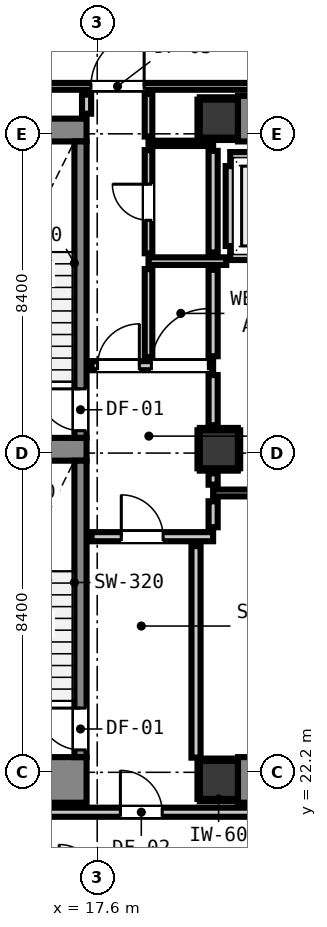
"""IFC4 building model, lengths in metres.
Left out: names, types, materials, properties, quantities, classifications, styles, units other than length and angle.
Written with IfcOpenShell. Run it as: python <this file> out.ifc"""

import sys

from ifc_helpers import new_model, si_unit, direction, frame, frame_2d, origin, origin_2d, place, context, subcontext, project, spatial, rectangle, extrude, element, fill, save


model = new_model("IFC4")
c1 = context("Model", 3, precision=1e-05, world=origin(), true_north=direction((0.0, 1.0)))
c2 = subcontext(c1, "Body", "Model", "MODEL_VIEW")
j1 = project(units=[si_unit("LENGTHUNIT", "METRE"), si_unit("PLANEANGLEUNIT", "RADIAN")], contexts=[c1])
p1 = place(None, origin())
s1 = spatial("IfcSite", under=j1, at=p1, CompositionType="ELEMENT")
p2 = place(p1, origin())
s2 = spatial("IfcBuilding", under=s1, at=p2, CompositionType="ELEMENT")
p3 = place(p2, frame((0.0, 0.0, 5.2)))
s3 = spatial("IfcBuildingStorey", under=s2, at=p3, CompositionType="ELEMENT", Elevation=5.2)
for number, where, z_axis, x_axis in (
    (1, (20.8, 22.0, 0.0), (0.0, 0.0, 1.0), (1.0, 0.0, 0.0)),
    (2, (20.8, 39.4, 0.0), (0.0, 0.0, 1.0), (1.0, 0.0, 0.0)),
):
    element("IfcColumn", number, at=place(p3, frame(where, z_axis=z_axis, x_axis=x_axis)), inside=s3, PredefinedType="COLUMN", context=c2, shape_type="SweptSolid", body=[
        extrude(rectangle(XDim=1.0, YDim=1.0, at=origin_2d()), origin(), (0.0, 0.0, 1.0), 4.2),
    ])
p4 = place(p3, frame((13.24, 22.0, 0.0), z_axis=(0.0, 0.0, 1.0), x_axis=(1.0, 0.0, 0.0)))
e3 = element("IfcWall", 3, at=p4, inside=s3, PredefinedType="SHEAR", context=c2, shape_type="SweptSolid", body=[
    extrude(rectangle(XDim=4.08, YDim=1.2, at=frame_2d((2.04, 0.0))), origin(), (0.0, 0.0, 1.0), 4.2),
])
p5 = place(p3, frame((13.24, 39.1, 0.0), z_axis=(0.0, 0.0, 1.0), x_axis=(1.0, 0.0, 0.0)))
e4 = element("IfcWall", 4, at=p5, inside=s3, PredefinedType="SHEAR", context=c2, shape_type="SweptSolid", body=[
    extrude(rectangle(XDim=4.08, YDim=0.6, at=frame_2d((2.04, 0.0))), origin(), (0.0, 0.0, 1.0), 4.2),
])
p6 = place(p3, frame((13.905, 30.7, 0.0), z_axis=(0.0, 0.0, 1.0), x_axis=(1.0, 0.0, 0.0)))
e5 = element("IfcWall", 5, at=p6, inside=s3, PredefinedType="SHEAR", context=c2, shape_type="SweptSolid", body=[
    extrude(rectangle(XDim=3.415, YDim=0.6, at=frame_2d((1.708, 0.0))), origin(), (0.0, 0.0, 1.0), 4.2),
])
for number, where, z_axis, x_axis in (
    (6, (21.305, 22.0, 0.0), (0.0, 0.0, 1.0), (1.0, 0.0, 0.0)),
    (7, (21.305, 39.4, 0.0), (0.0, 0.0, 1.0), (1.0, 0.0, 0.0)),
):
    element("IfcWall", number, at=place(p3, frame(where, z_axis=z_axis, x_axis=x_axis)), inside=s3, PredefinedType="SHEAR", context=c2, shape_type="SweptSolid", body=[
        extrude(rectangle(XDim=7.39, YDim=1.2, at=frame_2d((3.695, 0.0))), origin(), (0.0, 0.0, 1.0), 4.2),
    ])
p7 = place(p3, frame((17.16, 31.0, 0.0), z_axis=(0.0, 0.0, 1.0), x_axis=(0.0, 1.0, 0.0)))
e8 = element("IfcWall", 8, at=p7, inside=s3, PredefinedType="SHEAR", context=c2, shape_type="SweptSolid", body=[
    extrude(rectangle(XDim=7.8, YDim=0.32, at=frame_2d((3.9, 0.0))), origin(), (0.0, 0.0, 1.0), 4.2),
])
p8 = place(p7, frame((0.19, 0.0, 0.0)))
e9 = element("IfcOpeningElement", 9, at=p8, cuts=e8, PredefinedType="OPENING", context=c2, shape_type="SweptSolid", body=[
    extrude(rectangle(XDim=1.1, YDim=2.15, at=frame_2d((0.55, 1.075))), frame((0.0, 0.17, 0.0), z_axis=(0.0, -1.0, 0.0), x_axis=(1.0, 0.0, 0.0)), (0.0, 0.0, 1.0), 0.34),
])
p9 = place(p3, frame((17.16, 22.6, 0.0), z_axis=(0.0, 0.0, 1.0), x_axis=(0.0, 1.0, 0.0)))
e10 = element("IfcWall", 10, at=p9, inside=s3, PredefinedType="SHEAR", context=c2, shape_type="SweptSolid", body=[
    extrude(rectangle(XDim=7.8, YDim=0.32, at=frame_2d((3.9, 0.0))), origin(), (0.0, 0.0, 1.0), 4.2),
])
p10 = place(p9, frame((0.19, 0.0, 0.0)))
e11 = element("IfcOpeningElement", 11, at=p10, cuts=e10, PredefinedType="OPENING", context=c2, shape_type="SweptSolid", body=[
    extrude(rectangle(XDim=1.1, YDim=2.15, at=frame_2d((0.55, 1.075))), frame((0.0, 0.17, 0.0), z_axis=(0.0, -1.0, 0.0), x_axis=(1.0, 0.0, 0.0)), (0.0, 0.0, 1.0), 0.34),
])
p11 = place(p3, frame((20.8, 30.7, 0.0), z_axis=(0.0, 0.0, 1.0), x_axis=(1.0, 0.0, 0.0)))
e12 = element("IfcColumn", 12, at=p11, inside=s3, PredefinedType="COLUMN", context=c2, shape_type="SweptSolid", body=[
    extrude(rectangle(XDim=1.0, YDim=1.0, at=origin_2d()), origin(), (0.0, 0.0, 1.0), 4.2),
])
for number, where, z_axis, x_axis in (
    (13, (21.1, 35.8, 0.0), (0.0, 0.0, 1.0), (1.0, 0.0, 0.0)),
    (14, (21.1, 38.4, 0.0), (0.0, 0.0, 1.0), (1.0, 0.0, 0.0)),
):
    element("IfcWall", number, at=place(p3, frame(where, z_axis=z_axis, x_axis=x_axis)), inside=s3, PredefinedType="PARTITIONING", context=c2, shape_type="SweptSolid", body=[
        extrude(rectangle(XDim=2.2, YDim=0.24, at=frame_2d((1.1, 0.0))), origin(), (0.0, 0.0, 1.0), 3.92),
    ])
p12 = place(p3, frame((21.1, 36.048, 0.0), z_axis=(0.0, 0.0, 1.0), x_axis=(0.0, 1.0, 0.0)))
e15 = element("IfcWall", 15, at=p12, inside=s3, PredefinedType="PARTITIONING", context=c2, shape_type="SweptSolid", body=[
    extrude(rectangle(XDim=2.104, YDim=0.24, at=frame_2d((1.052, 0.0))), origin(), (0.0, 0.0, 1.0), 2.955),
])
p13 = place(p3, frame((10.5, 21.15, 0.0), z_axis=(0.0, 0.0, 1.0), x_axis=(1.0, 0.0, 0.0)))
e16 = element("IfcWall", 16, at=p13, inside=s3, PredefinedType="PARTITIONING", context=c2, shape_type="SweptSolid", body=[
    extrude(rectangle(XDim=28.7, YDim=0.24, at=frame_2d((14.35, 0.0))), origin(), (0.0, 0.0, 1.0), 3.92),
])
p14 = place(p13, frame((7.71, 0.0, 0.0)))
e17 = element("IfcOpeningElement", 17, at=p14, cuts=e16, PredefinedType="OPENING", context=c2, shape_type="SweptSolid", body=[
    extrude(rectangle(XDim=1.1, YDim=2.15, at=frame_2d((0.55, 1.075))), frame((0.0, 0.13, 0.0), z_axis=(0.0, -1.0, 0.0), x_axis=(1.0, 0.0, 0.0)), (0.0, 0.0, 1.0), 0.26),
])
p15 = place(p13, frame((0.324, 0.0, 0.0)))
e18 = element("IfcOpeningElement", 18, at=p15, cuts=e16, PredefinedType="OPENING", context=c2, shape_type="SweptSolid", body=[
    extrude(rectangle(XDim=1.4, YDim=2.15, at=frame_2d((0.7, 1.075))), frame((0.0, 0.13, 0.0), z_axis=(0.0, -1.0, 0.0), x_axis=(1.0, 0.0, 0.0)), (0.0, 0.0, 1.0), 0.26),
])
p16 = place(p13, frame((27.026, 0.0, 0.0)))
e19 = element("IfcOpeningElement", 19, at=p16, cuts=e16, PredefinedType="OPENING", context=c2, shape_type="SweptSolid", body=[
    extrude(rectangle(XDim=1.4, YDim=2.15, at=frame_2d((0.7, 1.075))), frame((0.0, 0.13, 0.0), z_axis=(0.0, -1.0, 0.0), x_axis=(1.0, 0.0, 0.0)), (0.0, 0.0, 1.0), 0.26),
])
p17 = place(p3, frame((17.45, 28.4, 0.0), z_axis=(0.0, 0.0, 1.0), x_axis=(1.0, 0.0, 0.0)))
e20 = element("IfcWall", 20, at=p17, inside=s3, PredefinedType="PARTITIONING", context=c2, shape_type="SweptSolid", body=[
    extrude(rectangle(XDim=3.2, YDim=0.24, at=frame_2d((1.6, 0.0))), origin(), (0.0, 0.0, 1.0), 3.92),
])
p18 = place(p17, frame((0.784, 0.0, 0.0)))
e21 = element("IfcOpeningElement", 21, at=p18, cuts=e20, PredefinedType="OPENING", context=c2, shape_type="SweptSolid", body=[
    extrude(rectangle(XDim=1.1, YDim=2.15, at=frame_2d((0.55, 1.075))), frame((0.0, 0.13, 0.0), z_axis=(0.0, -1.0, 0.0), x_axis=(1.0, 0.0, 0.0)), (0.0, 0.0, 1.0), 0.26),
])
p19 = place(p3, frame((17.45, 32.9, 0.0), z_axis=(0.0, 0.0, 1.0), x_axis=(1.0, 0.0, 0.0)))
e22 = element("IfcWall", 22, at=p19, inside=s3, PredefinedType="PARTITIONING", context=c2, shape_type="SweptSolid", body=[
    extrude(rectangle(XDim=3.2, YDim=0.24, at=frame_2d((1.6, 0.0))), origin(), (0.0, 0.0, 1.0), 3.92),
])
p20 = place(p19, frame((0.159, 0.0, 0.0)))
e23 = element("IfcOpeningElement", 23, at=p20, cuts=e22, PredefinedType="OPENING", context=c2, shape_type="SweptSolid", body=[
    extrude(rectangle(XDim=1.1, YDim=2.15, at=frame_2d((0.55, 1.075))), frame((0.0, 0.13, 0.0), z_axis=(0.0, -1.0, 0.0), x_axis=(1.0, 0.0, 0.0)), (0.0, 0.0, 1.0), 0.26),
])
p21 = place(p19, frame((1.576, 0.0, 0.0)))
e24 = element("IfcOpeningElement", 24, at=p21, cuts=e22, PredefinedType="OPENING", context=c2, shape_type="SweptSolid", body=[
    extrude(rectangle(XDim=1.5, YDim=2.15, at=frame_2d((0.75, 1.075))), frame((0.0, 0.13, 0.0), z_axis=(0.0, -1.0, 0.0), x_axis=(1.0, 0.0, 0.0)), (0.0, 0.0, 1.0), 0.26),
])
p22 = place(p3, frame((18.95, 35.65, 0.0), z_axis=(0.0, 0.0, 1.0), x_axis=(1.0, 0.0, 0.0)))
e25 = element("IfcWall", 25, at=p22, inside=s3, PredefinedType="PARTITIONING", context=c2, shape_type="SweptSolid", body=[
    extrude(rectangle(XDim=2.046, YDim=0.2, at=frame_2d((1.023, 0.0))), origin(), (0.0, 0.0, 1.0), 3.92),
])
p23 = place(p3, frame((20.65, 29.55, 0.0), z_axis=(0.0, 0.0, 1.0), x_axis=(1.0, 0.0, 0.0)))
e26 = element("IfcWall", 26, at=p23, inside=s3, PredefinedType="PARTITIONING", context=c2, shape_type="SweptSolid", body=[
    extrude(rectangle(XDim=9.325, YDim=0.18, at=frame_2d((4.663, 0.0))), origin(), (0.0, 0.0, 1.0), 3.92),
])
p24 = place(p3, frame((10.5, 40.25, 0.0), z_axis=(0.0, 0.0, 1.0), x_axis=(1.0, 0.0, 0.0)))
e27 = element("IfcWall", 27, at=p24, inside=s3, PredefinedType="PARTITIONING", context=c2, shape_type="SweptSolid", body=[
    extrude(rectangle(XDim=37.148, YDim=0.18, at=frame_2d((18.574, 0.0))), origin(), (0.0, 0.0, 1.0), 3.92),
])
p25 = place(p24, frame((6.935, 0.0, 0.0)))
e28 = element("IfcOpeningElement", 28, at=p25, cuts=e27, PredefinedType="OPENING", context=c2, shape_type="SweptSolid", body=[
    extrude(rectangle(XDim=1.4, YDim=2.15, at=frame_2d((0.7, 1.075))), frame((0.0, 0.1, 0.0), z_axis=(0.0, -1.0, 0.0), x_axis=(1.0, 0.0, 0.0)), (0.0, 0.0, 1.0), 0.2),
])
p26 = place(p24, frame((0.324, 0.0, 0.0)))
e29 = element("IfcOpeningElement", 29, at=p26, cuts=e27, PredefinedType="OPENING", context=c2, shape_type="SweptSolid", body=[
    extrude(rectangle(XDim=1.4, YDim=2.15, at=frame_2d((0.7, 1.075))), frame((0.0, 0.1, 0.0), z_axis=(0.0, -1.0, 0.0), x_axis=(1.0, 0.0, 0.0)), (0.0, 0.0, 1.0), 0.2),
])
p27 = place(p24, frame((27.05, 0.0, 0.0)))
e30 = element("IfcOpeningElement", 30, at=p27, cuts=e27, PredefinedType="OPENING", context=c2, shape_type="SweptSolid", body=[
    extrude(rectangle(XDim=1.4, YDim=2.15, at=frame_2d((0.7, 1.075))), frame((0.0, 0.1, 0.0), z_axis=(0.0, -1.0, 0.0), x_axis=(1.0, 0.0, 0.0)), (0.0, 0.0, 1.0), 0.2),
])
p28 = place(p3, frame((18.95, 38.75, 0.0), z_axis=(0.0, 0.0, 1.0), x_axis=(1.0, 0.0, 0.0)))
e31 = element("IfcWall", 31, at=p28, inside=s3, PredefinedType="PARTITIONING", context=c2, shape_type="SweptSolid", body=[
    extrude(rectangle(XDim=1.7, YDim=0.14, at=frame_2d((0.85, 0.0))), origin(), (0.0, 0.0, 1.0), 3.92),
])
p29 = place(p3, frame((17.32, 39.53, 0.0), z_axis=(0.0, 0.0, 1.0), x_axis=(0.0, 1.0, 0.0)))
e32 = element("IfcWall", 32, at=p29, inside=s3, PredefinedType="PARTITIONING", context=c2, shape_type="SweptSolid", body=[
    extrude(rectangle(XDim=0.502, YDim=0.24, at=frame_2d((0.251, 0.0))), origin(), (0.0, 0.0, 1.0), 3.92),
])
p30 = place(p3, frame((20.2, 22.586, 0.0), z_axis=(0.0, 0.0, 1.0), x_axis=(0.0, 1.0, 0.0)))
e33 = element("IfcWall", 33, at=p30, inside=s3, PredefinedType="PARTITIONING", context=c2, shape_type="SweptSolid", body=[
    extrude(rectangle(XDim=5.566, YDim=0.24, at=frame_2d((2.783, 0.0))), origin(), (0.0, 0.0, 1.0), 3.92),
])
p31 = place(p3, frame((20.65, 28.648, 0.0), z_axis=(0.0, 0.0, 1.0), x_axis=(0.0, 1.0, 0.0)))
e34 = element("IfcWall", 34, at=p31, inside=s3, PredefinedType="PARTITIONING", context=c2, shape_type="SweptSolid", body=[
    extrude(rectangle(XDim=0.684, YDim=0.24, at=frame_2d((0.342, 0.0))), origin(), (0.0, 0.0, 1.0), 2.955),
])
p32 = place(p3, frame((20.65, 29.768, 0.0), z_axis=(0.0, 0.0, 1.0), x_axis=(0.0, 1.0, 0.0)))
e35 = element("IfcWall", 35, at=p32, inside=s3, PredefinedType="PARTITIONING", context=c2, shape_type="SweptSolid", body=[
    extrude(rectangle(XDim=0.3, YDim=0.24, at=frame_2d((0.15, 0.0))), origin(), (0.0, 0.0, 1.0), 2.955),
])
p33 = place(p3, frame((20.65, 31.332, 0.0), z_axis=(0.0, 0.0, 1.0), x_axis=(0.0, 1.0, 0.0)))
e36 = element("IfcWall", 36, at=p33, inside=s3, PredefinedType="PARTITIONING", context=c2, shape_type="SweptSolid", body=[
    extrude(rectangle(XDim=1.32, YDim=0.24, at=frame_2d((0.66, 0.0))), origin(), (0.0, 0.0, 1.0), 2.955),
])
p34 = place(p3, frame((20.65, 33.148, 0.0), z_axis=(0.0, 0.0, 1.0), x_axis=(0.0, 1.0, 0.0)))
e37 = element("IfcWall", 37, at=p34, inside=s3, PredefinedType="PARTITIONING", context=c2, shape_type="SweptSolid", body=[
    extrude(rectangle(XDim=2.274, YDim=0.24, at=frame_2d((1.137, 0.0))), origin(), (0.0, 0.0, 1.0), 2.955),
])
p35 = place(p3, frame((20.65, 35.878, 0.0), z_axis=(0.0, 0.0, 1.0), x_axis=(0.0, 1.0, 0.0)))
e38 = element("IfcWall", 38, at=p35, inside=s3, PredefinedType="PARTITIONING", context=c2, shape_type="SweptSolid", body=[
    extrude(rectangle(XDim=2.674, YDim=0.24, at=frame_2d((1.337, 0.0))), origin(), (0.0, 0.0, 1.0), 2.955),
])
p36 = place(p3, frame((18.95, 33.128, 0.0), z_axis=(0.0, 0.0, 1.0), x_axis=(0.0, 1.0, 0.0)))
e39 = element("IfcWall", 39, at=p36, inside=s3, PredefinedType="PARTITIONING", context=c2, shape_type="SweptSolid", body=[
    extrude(rectangle(XDim=2.314, YDim=0.2, at=frame_2d((1.157, 0.0))), origin(), (0.0, 0.0, 1.0), 3.92),
])
p37 = place(p3, frame((18.95, 35.858, 0.0), z_axis=(0.0, 0.0, 1.0), x_axis=(0.0, 1.0, 0.0)))
e40 = element("IfcWall", 40, at=p37, inside=s3, PredefinedType="PARTITIONING", context=c2, shape_type="SweptSolid", body=[
    extrude(rectangle(XDim=2.714, YDim=0.2, at=frame_2d((1.357, 0.0))), origin(), (0.0, 0.0, 1.0), 3.92),
])
p38 = place(p37, frame((0.867, 0.0, 0.0)))
e41 = element("IfcOpeningElement", 41, at=p38, cuts=e40, PredefinedType="OPENING", context=c2, shape_type="SweptSolid", body=[
    extrude(rectangle(XDim=0.95, YDim=2.1, at=frame_2d((0.475, 1.05))), frame((0.0, 0.11, 0.0), z_axis=(0.0, -1.0, 0.0), x_axis=(1.0, 0.0, 0.0)), (0.0, 0.0, 1.0), 0.22),
])
p39 = place(p3, frame((18.95, 38.928, 0.0), z_axis=(0.0, 0.0, 1.0), x_axis=(0.0, 1.0, 0.0)))
e42 = element("IfcWall", 42, at=p39, inside=s3, PredefinedType="PARTITIONING", context=c2, shape_type="SweptSolid", body=[
    extrude(rectangle(XDim=1.124, YDim=0.2, at=frame_2d((0.562, 0.0))), origin(), (0.0, 0.0, 1.0), 3.92),
])
for number, where, z_axis, x_axis in (
    (43, (20.3, 21.468, 0.0), (0.0, 0.0, 1.0), (1.0, 0.0, 0.0)),
    (44, (20.3, 22.532, 0.0), (0.0, 0.0, 1.0), (1.0, 0.0, 0.0)),
):
    element("IfcWall", number, at=place(p3, frame(where, z_axis=z_axis, x_axis=x_axis)), inside=s3, PredefinedType="PARTITIONING", context=c2, shape_type="SweptSolid", body=[
        extrude(rectangle(XDim=0.99, YDim=0.06, at=frame_2d((0.495, 0.0))), origin(), (0.0, 0.0, 1.0), 1.45),
    ])
p40 = place(p3, frame((20.268, 21.5, 0.0), z_axis=(0.0, 0.0, 1.0), x_axis=(0.0, 1.0, 0.0)))
e45 = element("IfcWall", 45, at=p40, inside=s3, PredefinedType="PARTITIONING", context=c2, shape_type="SweptSolid", body=[
    extrude(rectangle(XDim=1.0, YDim=0.06, at=frame_2d((0.5, 0.0))), origin(), (0.0, 0.0, 1.0), 1.45),
])
for number, where, z_axis, x_axis in (
    (46, (20.3, 38.868, 0.0), (0.0, 0.0, 1.0), (1.0, 0.0, 0.0)),
    (47, (20.3, 39.932, 0.0), (0.0, 0.0, 1.0), (1.0, 0.0, 0.0)),
):
    element("IfcWall", number, at=place(p3, frame(where, z_axis=z_axis, x_axis=x_axis)), inside=s3, PredefinedType="PARTITIONING", context=c2, shape_type="SweptSolid", body=[
        extrude(rectangle(XDim=0.99, YDim=0.06, at=frame_2d((0.495, 0.0))), origin(), (0.0, 0.0, 1.0), 1.45),
    ])
for number, where, z_axis, x_axis in (
    (48, (20.268, 38.9, 0.0), (0.0, 0.0, 1.0), (0.0, 1.0, 0.0)),
    (49, (20.3, 30.168, 0.0), (0.0, 0.0, 1.0), (1.0, 0.0, 0.0)),
    (50, (20.3, 31.232, 0.0), (0.0, 0.0, 1.0), (1.0, 0.0, 0.0)),
    (51, (20.268, 30.2, 0.0), (0.0, 0.0, 1.0), (0.0, 1.0, 0.0)),
    (52, (21.332, 30.2, 0.0), (0.0, 0.0, 1.0), (0.0, 1.0, 0.0)),
):
    element("IfcWall", number, at=place(p3, frame(where, z_axis=z_axis, x_axis=x_axis)), inside=s3, PredefinedType="PARTITIONING", context=c2, shape_type="SweptSolid", body=[
        extrude(rectangle(XDim=1.0, YDim=0.06, at=frame_2d((0.5, 0.0))), origin(), (0.0, 0.0, 1.0), 1.45),
    ])
p41 = place(p8, origin())
e53 = element("IfcDoor", 53, at=p41, inside=s3, OperationType="SINGLE_SWING_RIGHT", PredefinedType="DOOR", context=c2, shape_type="SweptSolid", body=[
    extrude(rectangle(XDim=1.1, YDim=2.15, at=frame_2d((0.55, 1.075))), frame((0.0, 0.025, 0.0), z_axis=(0.0, -1.0, 0.0), x_axis=(1.0, 0.0, 0.0)), (0.0, 0.0, 1.0), 0.05),
])
fill(e9, e53)
p42 = place(p10, origin())
e54 = element("IfcDoor", 54, at=p42, inside=s3, OperationType="SINGLE_SWING_RIGHT", PredefinedType="DOOR", context=c2, shape_type="SweptSolid", body=[
    extrude(rectangle(XDim=1.1, YDim=2.15, at=frame_2d((0.55, 1.075))), frame((0.0, 0.025, 0.0), z_axis=(0.0, -1.0, 0.0), x_axis=(1.0, 0.0, 0.0)), (0.0, 0.0, 1.0), 0.05),
])
fill(e11, e54)
p43 = place(p18, origin())
e55 = element("IfcDoor", 55, at=p43, inside=s3, OperationType="SINGLE_SWING_LEFT", PredefinedType="DOOR", context=c2, shape_type="SweptSolid", body=[
    extrude(rectangle(XDim=1.1, YDim=2.15, at=frame_2d((0.55, 1.075))), frame((0.0, 0.025, 0.0), z_axis=(0.0, -1.0, 0.0), x_axis=(1.0, 0.0, 0.0)), (0.0, 0.0, 1.0), 0.05),
])
fill(e21, e55)
p44 = place(p20, origin())
e56 = element("IfcDoor", 56, at=p44, inside=s3, OperationType="SINGLE_SWING_RIGHT", PredefinedType="DOOR", context=c2, shape_type="SweptSolid", body=[
    extrude(rectangle(XDim=1.1, YDim=2.15, at=frame_2d((0.55, 1.075))), frame((0.0, 0.025, 0.0), z_axis=(0.0, -1.0, 0.0), x_axis=(1.0, 0.0, 0.0)), (0.0, 0.0, 1.0), 0.05),
])
fill(e23, e56)
p45 = place(p14, origin())
e57 = element("IfcDoor", 57, at=p45, inside=s3, OperationType="SINGLE_SWING_LEFT", PredefinedType="DOOR", context=c2, shape_type="SweptSolid", body=[
    extrude(rectangle(XDim=1.1, YDim=2.15, at=frame_2d((0.55, 1.075))), frame((0.0, 0.025, 0.0), z_axis=(0.0, -1.0, 0.0), x_axis=(1.0, 0.0, 0.0)), (0.0, 0.0, 1.0), 0.05),
])
fill(e17, e57)
p46 = place(p25, origin())
e58 = element("IfcDoor", 58, at=p46, inside=s3, OperationType="SINGLE_SWING_RIGHT", PredefinedType="DOOR", context=c2, shape_type="SweptSolid", body=[
    extrude(rectangle(XDim=1.4, YDim=2.15, at=frame_2d((0.7, 1.075))), frame((0.0, 0.025, 0.0), z_axis=(0.0, -1.0, 0.0), x_axis=(1.0, 0.0, 0.0)), (0.0, 0.0, 1.0), 0.05),
])
fill(e28, e58)
p47 = place(p21, origin())
e59 = element("IfcDoor", 59, at=p47, inside=s3, OperationType="SINGLE_SWING_RIGHT", PredefinedType="DOOR", context=c2, shape_type="SweptSolid", body=[
    extrude(rectangle(XDim=1.5, YDim=2.15, at=frame_2d((0.75, 1.075))), frame((0.0, 0.025, 0.0), z_axis=(0.0, -1.0, 0.0), x_axis=(1.0, 0.0, 0.0)), (0.0, 0.0, 1.0), 0.05),
])
fill(e24, e59)
p48 = place(p38, origin())
e60 = element("IfcDoor", 60, at=p48, inside=s3, OperationType="SINGLE_SWING_RIGHT", PredefinedType="DOOR", context=c2, shape_type="SweptSolid", body=[
    extrude(rectangle(XDim=0.95, YDim=2.1, at=frame_2d((0.475, 1.05))), frame((0.0, 0.025, 0.0), z_axis=(0.0, -1.0, 0.0), x_axis=(1.0, 0.0, 0.0)), (0.0, 0.0, 1.0), 0.05),
])
fill(e41, e60)
save(model, sys.argv[1])
